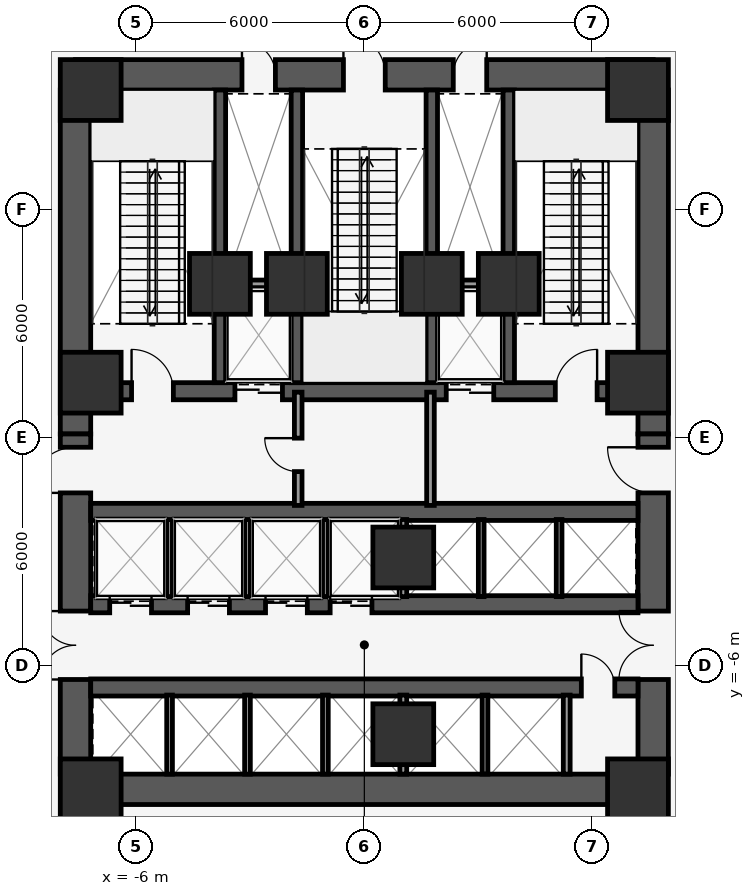
"""IFC4 building model, lengths in metres.
Left out: names, types, materials, properties, quantities, classifications, styles, units other than length and angle.
Written with IfcOpenShell. Run it as: python <this file> out.ifc"""

import sys

from ifc_helpers import new_model, si_unit, direction, frame, frame_2d, origin, origin_2d, place, context, subcontext, project, spatial, rectangle, extrude, element, fill, save


model = new_model("IFC4")
c1 = context("Model", 3, precision=1e-05, world=origin(), true_north=direction((0.0, 1.0)))
c2 = subcontext(c1, "Body", "Model", "MODEL_VIEW")
j1 = project(units=[si_unit("LENGTHUNIT", "METRE"), si_unit("PLANEANGLEUNIT", "RADIAN")], contexts=[c1])
p1 = place(None, origin())
s1 = spatial("IfcSite", under=j1, at=p1, CompositionType="ELEMENT")
p2 = place(p1, origin())
s2 = spatial("IfcBuilding", under=s1, at=p2, CompositionType="ELEMENT")
p3 = place(p2, frame((0.0, 0.0, 6.0)))
s3 = spatial("IfcBuildingStorey", under=s2, at=p3, CompositionType="ELEMENT", Elevation=6.0)
p4 = place(p3, frame((-7.6, 9.55, 0.0), z_axis=(0.0, 0.0, 1.0), x_axis=(1.0, 0.0, 0.0)))
e1 = element("IfcWall", 1, at=p4, inside=s3, PredefinedType="SHEAR", context=c2, shape_type="SweptSolid", body=[
    extrude(rectangle(XDim=15.2, YDim=0.8, at=frame_2d((7.6, 0.0))), origin(), (0.0, 0.0, 1.0), 5.2),
])
p5 = place(p4, frame((7.05, 0.0, 0.0)))
e2 = element("IfcOpeningElement", 2, at=p5, cuts=e1, PredefinedType="OPENING", context=c2, shape_type="SweptSolid", body=[
    extrude(rectangle(XDim=1.1, YDim=2.15, at=frame_2d((0.55, 1.075))), frame((0.0, 0.41, 0.0), z_axis=(0.0, -1.0, 0.0), x_axis=(1.0, 0.0, 0.0)), (0.0, 0.0, 1.0), 0.82),
])
p6 = place(p4, frame((4.38, 0.0, 0.0)))
e3 = element("IfcOpeningElement", 3, at=p6, cuts=e1, PredefinedType="OPENING", context=c2, shape_type="SweptSolid", body=[
    extrude(rectangle(XDim=0.88, YDim=2.15, at=frame_2d((0.44, 1.075))), frame((0.0, 0.41, 0.0), z_axis=(0.0, -1.0, 0.0), x_axis=(1.0, 0.0, 0.0)), (0.0, 0.0, 1.0), 0.82),
])
p7 = place(p4, frame((9.94, 0.0, 0.0)))
e4 = element("IfcOpeningElement", 4, at=p7, cuts=e1, PredefinedType="OPENING", context=c2, shape_type="SweptSolid", body=[
    extrude(rectangle(XDim=0.88, YDim=2.15, at=frame_2d((0.44, 1.075))), frame((0.0, 0.41, 0.0), z_axis=(0.0, -1.0, 0.0), x_axis=(1.0, 0.0, 0.0)), (0.0, 0.0, 1.0), 0.82),
])
p8 = place(p3, frame((-7.2, 1.225, 0.0), z_axis=(0.0, 0.0, 1.0), x_axis=(1.0, 0.0, 0.0)))
e5 = element("IfcWall", 5, at=p8, inside=s3, PredefinedType="SHEAR", context=c2, shape_type="SweptSolid", body=[
    extrude(rectangle(XDim=14.4, YDim=0.45, at=frame_2d((7.2, 0.0))), origin(), (0.0, 0.0, 1.0), 5.2),
])
p9 = place(p8, frame((3.795, 0.0, 0.0)))
e6 = element("IfcOpeningElement", 6, at=p9, cuts=e5, PredefinedType="OPENING", context=c2, shape_type="SweptSolid", body=[
    extrude(rectangle(XDim=1.25, YDim=2.25, at=frame_2d((0.625, 1.125))), frame((0.0, 0.235, 0.0), z_axis=(0.0, -1.0, 0.0), x_axis=(1.0, 0.0, 0.0)), (0.0, 0.0, 1.0), 0.47),
])
p10 = place(p8, frame((9.355, 0.0, 0.0)))
e7 = element("IfcOpeningElement", 7, at=p10, cuts=e5, PredefinedType="OPENING", context=c2, shape_type="SweptSolid", body=[
    extrude(rectangle(XDim=1.25, YDim=2.25, at=frame_2d((0.625, 1.125))), frame((0.0, 0.235, 0.0), z_axis=(0.0, -1.0, 0.0), x_axis=(1.0, 0.0, 0.0)), (0.0, 0.0, 1.0), 0.47),
])
p11 = place(p8, frame((1.075, 0.0, 0.0)))
e8 = element("IfcOpeningElement", 8, at=p11, cuts=e5, PredefinedType="OPENING", context=c2, shape_type="SweptSolid", body=[
    extrude(rectangle(XDim=1.1, YDim=2.15, at=frame_2d((0.55, 1.075))), frame((0.0, 0.235, 0.0), z_axis=(0.0, -1.0, 0.0), x_axis=(1.0, 0.0, 0.0)), (0.0, 0.0, 1.0), 0.47),
])
p12 = place(p8, frame((12.225, 0.0, 0.0)))
e9 = element("IfcOpeningElement", 9, at=p12, cuts=e5, PredefinedType="OPENING", context=c2, shape_type="SweptSolid", body=[
    extrude(rectangle(XDim=1.1, YDim=2.15, at=frame_2d((0.55, 1.075))), frame((0.0, 0.235, 0.0), z_axis=(0.0, -1.0, 0.0), x_axis=(1.0, 0.0, 0.0)), (0.0, 0.0, 1.0), 0.47),
])
for number, where, z_axis, x_axis in (
    (10, (-3.8, 1.45, 0.0), (0.0, 0.0, 1.0), (0.0, 1.0, 0.0)),
    (11, (-1.775, 1.45, 0.0), (0.0, 0.0, 1.0), (0.0, 1.0, 0.0)),
    (12, (1.775, 1.45, 0.0), (0.0, 0.0, 1.0), (0.0, 1.0, 0.0)),
    (13, (3.8, 1.45, 0.0), (0.0, 0.0, 1.0), (0.0, 1.0, 0.0)),
):
    element("IfcWall", number, at=place(p3, frame(where, z_axis=z_axis, x_axis=x_axis)), inside=s3, PredefinedType="SHEAR", context=c2, shape_type="SweptSolid", body=[
        extrude(rectangle(XDim=7.7, YDim=0.3, at=frame_2d((3.85, 0.0))), origin(), (0.0, 0.0, 1.0), 5.2),
    ])
for number, where, z_axis, x_axis in (
    (14, (-7.6, 0.1, 0.0), (0.0, 0.0, 1.0), (0.0, 1.0, 0.0)),
    (15, (7.6, 0.1, 0.0), (0.0, 0.0, 1.0), (0.0, 1.0, 0.0)),
):
    element("IfcWall", number, at=place(p3, frame(where, z_axis=z_axis, x_axis=x_axis)), inside=s3, PredefinedType="SHEAR", context=c2, shape_type="SweptSolid", body=[
        extrude(rectangle(XDim=9.05, YDim=0.8, at=frame_2d((4.525, 0.0))), origin(), (0.0, 0.0, 1.0), 5.2),
    ])
p13 = place(p3, frame((-7.6, -8.85, 0.0), z_axis=(0.0, 0.0, 1.0), x_axis=(0.0, 1.0, 0.0)))
e16 = element("IfcWall", 16, at=p13, inside=s3, PredefinedType="SHEAR", context=c2, shape_type="SweptSolid", body=[
    extrude(rectangle(XDim=8.95, YDim=0.8, at=frame_2d((4.475, 0.0))), origin(), (0.0, 0.0, 1.0), 5.2),
])
p14 = place(p13, frame((2.49, 0.0, 0.0)))
e17 = element("IfcOpeningElement", 17, at=p14, cuts=e16, PredefinedType="OPENING", context=c2, shape_type="SweptSolid", body=[
    extrude(rectangle(XDim=1.8, YDim=2.2, at=frame_2d((0.9, 1.1))), frame((0.0, 0.41, 0.0), z_axis=(0.0, -1.0, 0.0), x_axis=(1.0, 0.0, 0.0)), (0.0, 0.0, 1.0), 0.82),
])
p15 = place(p13, frame((7.4, 0.0, 0.0)))
e18 = element("IfcOpeningElement", 18, at=p15, cuts=e16, PredefinedType="OPENING", context=c2, shape_type="SweptSolid", body=[
    extrude(rectangle(XDim=1.2, YDim=2.15, at=frame_2d((0.6, 1.075))), frame((0.0, 0.41, 0.0), z_axis=(0.0, -1.0, 0.0), x_axis=(1.0, 0.0, 0.0)), (0.0, 0.0, 1.0), 0.82),
])
p16 = place(p3, frame((7.6, -8.85, 0.0), z_axis=(0.0, 0.0, 1.0), x_axis=(0.0, 1.0, 0.0)))
e19 = element("IfcWall", 19, at=p16, inside=s3, PredefinedType="SHEAR", context=c2, shape_type="SweptSolid", body=[
    extrude(rectangle(XDim=8.95, YDim=0.8, at=frame_2d((4.475, 0.0))), origin(), (0.0, 0.0, 1.0), 5.2),
])
p17 = place(p16, frame((2.49, 0.0, 0.0)))
e20 = element("IfcOpeningElement", 20, at=p17, cuts=e19, PredefinedType="OPENING", context=c2, shape_type="SweptSolid", body=[
    extrude(rectangle(XDim=1.8, YDim=2.2, at=frame_2d((0.9, 1.1))), frame((0.0, 0.41, 0.0), z_axis=(0.0, -1.0, 0.0), x_axis=(1.0, 0.0, 0.0)), (0.0, 0.0, 1.0), 0.82),
])
p18 = place(p16, frame((7.4, 0.0, 0.0)))
e21 = element("IfcOpeningElement", 21, at=p18, cuts=e19, PredefinedType="OPENING", context=c2, shape_type="SweptSolid", body=[
    extrude(rectangle(XDim=1.2, YDim=2.15, at=frame_2d((0.6, 1.075))), frame((0.0, 0.41, 0.0), z_axis=(0.0, -1.0, 0.0), x_axis=(1.0, 0.0, 0.0)), (0.0, 0.0, 1.0), 0.82),
])
p19 = place(p3, frame((-7.6, -9.25, 0.0), z_axis=(0.0, 0.0, 1.0), x_axis=(1.0, 0.0, 0.0)))
e22 = element("IfcWall", 22, at=p19, inside=s3, PredefinedType="SHEAR", context=c2, shape_type="SweptSolid", body=[
    extrude(rectangle(XDim=15.2, YDim=0.8, at=frame_2d((7.6, 0.0))), origin(), (0.0, 0.0, 1.0), 5.2),
])
p20 = place(p3, frame((-7.2, -1.95, 0.0), z_axis=(0.0, 0.0, 1.0), x_axis=(1.0, 0.0, 0.0)))
e23 = element("IfcWall", 23, at=p20, inside=s3, PredefinedType="SHEAR", context=c2, shape_type="SweptSolid", body=[
    extrude(rectangle(XDim=14.4, YDim=0.45, at=frame_2d((7.2, 0.0))), origin(), (0.0, 0.0, 1.0), 5.2),
])
p21 = place(p3, frame((-7.2, -4.38, 0.0), z_axis=(0.0, 0.0, 1.0), x_axis=(1.0, 0.0, 0.0)))
e24 = element("IfcWall", 24, at=p21, inside=s3, PredefinedType="SHEAR", context=c2, shape_type="SweptSolid", body=[
    extrude(rectangle(XDim=14.4, YDim=0.45, at=frame_2d((7.2, 0.0))), origin(), (0.0, 0.0, 1.0), 5.2),
])
p22 = place(p21, frame((0.5, 0.0, 0.0)))
e25 = element("IfcOpeningElement", 25, at=p22, cuts=e24, PredefinedType="OPENING", context=c2, shape_type="SweptSolid", body=[
    extrude(rectangle(XDim=1.1, YDim=2.2, at=frame_2d((0.55, 1.1))), frame((0.0, 0.235, 0.0), z_axis=(0.0, -1.0, 0.0), x_axis=(1.0, 0.0, 0.0)), (0.0, 0.0, 1.0), 0.47),
])
p23 = place(p21, frame((2.55, 0.0, 0.0)))
e26 = element("IfcOpeningElement", 26, at=p23, cuts=e24, PredefinedType="OPENING", context=c2, shape_type="SweptSolid", body=[
    extrude(rectangle(XDim=1.1, YDim=2.2, at=frame_2d((0.55, 1.1))), frame((0.0, 0.235, 0.0), z_axis=(0.0, -1.0, 0.0), x_axis=(1.0, 0.0, 0.0)), (0.0, 0.0, 1.0), 0.47),
])
p24 = place(p21, frame((4.6, 0.0, 0.0)))
e27 = element("IfcOpeningElement", 27, at=p24, cuts=e24, PredefinedType="OPENING", context=c2, shape_type="SweptSolid", body=[
    extrude(rectangle(XDim=1.1, YDim=2.2, at=frame_2d((0.55, 1.1))), frame((0.0, 0.235, 0.0), z_axis=(0.0, -1.0, 0.0), x_axis=(1.0, 0.0, 0.0)), (0.0, 0.0, 1.0), 0.47),
])
p25 = place(p21, frame((6.3, 0.0, 0.0)))
e28 = element("IfcOpeningElement", 28, at=p25, cuts=e24, PredefinedType="OPENING", context=c2, shape_type="SweptSolid", body=[
    extrude(rectangle(XDim=1.1, YDim=2.2, at=frame_2d((0.55, 1.1))), frame((0.0, 0.235, 0.0), z_axis=(0.0, -1.0, 0.0), x_axis=(1.0, 0.0, 0.0)), (0.0, 0.0, 1.0), 0.47),
])
p26 = place(p3, frame((-7.2, -6.57, 0.0), z_axis=(0.0, 0.0, 1.0), x_axis=(1.0, 0.0, 0.0)))
e29 = element("IfcWall", 29, at=p26, inside=s3, PredefinedType="SHEAR", context=c2, shape_type="SweptSolid", body=[
    extrude(rectangle(XDim=14.4, YDim=0.45, at=frame_2d((7.2, 0.0))), origin(), (0.0, 0.0, 1.0), 5.2),
])
p27 = place(p26, frame((12.91, 0.0, 0.0)))
e30 = element("IfcOpeningElement", 30, at=p27, cuts=e29, PredefinedType="OPENING", context=c2, shape_type="SweptSolid", body=[
    extrude(rectangle(XDim=0.88, YDim=2.15, at=frame_2d((0.44, 1.075))), frame((0.0, 0.235, 0.0), z_axis=(0.0, -1.0, 0.0), x_axis=(1.0, 0.0, 0.0)), (0.0, 0.0, 1.0), 0.47),
])
for number, where, z_axis, x_axis in (
    (31, (-7.2, -9.25, 0.0), (0.0, 0.0, 1.0), (1.0, 0.0, 0.0)),
    (32, (7.2, -9.25, 0.0), (0.0, 0.0, 1.0), (1.0, 0.0, 0.0)),
    (33, (7.2, 1.45, 0.0), (0.0, 0.0, 1.0), (1.0, 0.0, 0.0)),
    (34, (7.2, 9.15, 0.0), (0.0, 0.0, 1.0), (1.0, 0.0, 0.0)),
    (35, (-7.2, 9.15, 0.0), (0.0, 0.0, 1.0), (1.0, 0.0, 0.0)),
    (36, (-7.2, 1.45, 0.0), (0.0, 0.0, 1.0), (1.0, 0.0, 0.0)),
    (37, (-3.8, 4.05, 0.0), (0.0, 0.0, 1.0), (1.0, 0.0, 0.0)),
    (38, (3.8, 4.05, 0.0), (0.0, 0.0, 1.0), (1.0, 0.0, 0.0)),
    (39, (-1.775, 4.05, 0.0), (0.0, 0.0, 1.0), (1.0, 0.0, 0.0)),
    (40, (1.775, 4.05, 0.0), (0.0, 0.0, 1.0), (1.0, 0.0, 0.0)),
    (41, (1.025, -3.15, 0.0), (0.0, 0.0, 1.0), (1.0, 0.0, 0.0)),
    (42, (1.025, -7.8, 0.0), (0.0, 0.0, 1.0), (1.0, 0.0, 0.0)),
):
    element("IfcColumn", number, at=place(p3, frame(where, z_axis=z_axis, x_axis=x_axis)), inside=s3, PredefinedType="COLUMN", context=c2, shape_type="SweptSolid", body=[
        extrude(rectangle(XDim=1.6, YDim=1.6, at=origin_2d()), origin(), (0.0, 0.0, 1.0), 5.5),
    ])
for number, where, z_axis, x_axis in (
    (43, (-3.65, 4.05, 0.0), (0.0, 0.0, 1.0), (1.0, 0.0, 0.0)),
    (44, (1.92, 4.05, 0.0), (0.0, 0.0, 1.0), (1.0, 0.0, 0.0)),
):
    element("IfcWall", number, at=place(p3, frame(where, z_axis=z_axis, x_axis=x_axis)), inside=s3, PredefinedType="PARTITIONING", context=c2, shape_type="SweptSolid", body=[
        extrude(rectangle(XDim=1.73, YDim=0.2, at=frame_2d((0.865, 0.0))), origin(), (0.0, 0.0, 1.0), 5.2),
    ])
for number, where, z_axis, x_axis in (
    (45, (-5.125, -4.18, 0.0), (0.0, 0.0, 1.0), (0.0, 1.0, 0.0)),
    (46, (-3.075, -4.18, 0.0), (0.0, 0.0, 1.0), (0.0, 1.0, 0.0)),
    (47, (-1.025, -4.18, 0.0), (0.0, 0.0, 1.0), (0.0, 1.0, 0.0)),
):
    element("IfcWall", number, at=place(p3, frame(where, z_axis=z_axis, x_axis=x_axis)), inside=s3, PredefinedType="PARTITIONING", context=c2, shape_type="SweptSolid", body=[
        extrude(rectangle(XDim=2.03, YDim=0.15, at=frame_2d((1.015, 0.0))), origin(), (0.0, 0.0, 1.0), 5.2),
    ])
p28 = place(p3, frame((1.025, -4.18, 0.0), z_axis=(0.0, 0.0, 1.0), x_axis=(0.0, 1.0, 0.0)))
e48 = element("IfcWall", 48, at=p28, inside=s3, PredefinedType="PARTITIONING", context=c2, shape_type="SweptSolid", body=[
    extrude(rectangle(XDim=2.03, YDim=0.18, at=frame_2d((1.015, 0.0))), origin(), (0.0, 0.0, 1.0), 4.248),
])
for number, where, z_axis, x_axis in (
    (49, (3.075, -4.18, 0.0), (0.0, 0.0, 1.0), (0.0, 1.0, 0.0)),
    (50, (5.125, -4.18, 0.0), (0.0, 0.0, 1.0), (0.0, 1.0, 0.0)),
):
    element("IfcWall", number, at=place(p3, frame(where, z_axis=z_axis, x_axis=x_axis)), inside=s3, PredefinedType="PARTITIONING", context=c2, shape_type="SweptSolid", body=[
        extrude(rectangle(XDim=2.03, YDim=0.15, at=frame_2d((1.015, 0.0))), origin(), (0.0, 0.0, 1.0), 5.2),
    ])
for number, where, z_axis, x_axis in (
    (51, (-5.125, -8.85, 0.0), (0.0, 0.0, 1.0), (0.0, 1.0, 0.0)),
    (52, (-3.075, -8.85, 0.0), (0.0, 0.0, 1.0), (0.0, 1.0, 0.0)),
    (53, (-1.025, -8.85, 0.0), (0.0, 0.0, 1.0), (0.0, 1.0, 0.0)),
):
    element("IfcWall", number, at=place(p3, frame(where, z_axis=z_axis, x_axis=x_axis)), inside=s3, PredefinedType="PARTITIONING", context=c2, shape_type="SweptSolid", body=[
        extrude(rectangle(XDim=2.08, YDim=0.15, at=frame_2d((1.04, 0.0))), origin(), (0.0, 0.0, 1.0), 5.2),
    ])
p29 = place(p3, frame((1.025, -8.85, 0.0), z_axis=(0.0, 0.0, 1.0), x_axis=(0.0, 1.0, 0.0)))
e54 = element("IfcWall", 54, at=p29, inside=s3, PredefinedType="PARTITIONING", context=c2, shape_type="SweptSolid", body=[
    extrude(rectangle(XDim=2.08, YDim=0.18, at=frame_2d((1.04, 0.0))), origin(), (0.0, 0.0, 1.0), 4.248),
])
p30 = place(p3, frame((3.175, -8.85, 0.0), z_axis=(0.0, 0.0, 1.0), x_axis=(0.0, 1.0, 0.0)))
e55 = element("IfcWall", 55, at=p30, inside=s3, PredefinedType="PARTITIONING", context=c2, shape_type="SweptSolid", body=[
    extrude(rectangle(XDim=2.08, YDim=0.15, at=frame_2d((1.04, 0.0))), origin(), (0.0, 0.0, 1.0), 5.2),
])
p31 = place(p3, frame((5.325, -8.85, 0.0), z_axis=(0.0, 0.0, 1.0), x_axis=(0.0, 1.0, 0.0)))
e56 = element("IfcWall", 56, at=p31, inside=s3, PredefinedType="PARTITIONING", context=c2, shape_type="SweptSolid", body=[
    extrude(rectangle(XDim=2.08, YDim=0.18, at=frame_2d((1.04, 0.0))), origin(), (0.0, 0.0, 1.0), 5.2),
])
p32 = place(p3, frame((-1.74, -1.78, 0.0), z_axis=(0.0, 0.0, 1.0), x_axis=(0.0, 1.0, 0.0)))
e57 = element("IfcWall", 57, at=p32, inside=s3, PredefinedType="PARTITIONING", context=c2, shape_type="SweptSolid", body=[
    extrude(rectangle(XDim=2.98, YDim=0.2, at=frame_2d((1.49, 0.0))), origin(), (0.0, 0.0, 1.0), 5.2),
])
p33 = place(p32, frame((0.89, 0.0, 0.0)))
e58 = element("IfcOpeningElement", 58, at=p33, cuts=e57, PredefinedType="OPENING", context=c2, shape_type="SweptSolid", body=[
    extrude(rectangle(XDim=0.88, YDim=2.15, at=frame_2d((0.44, 1.075))), frame((0.0, 0.11, 0.0), z_axis=(0.0, -1.0, 0.0), x_axis=(1.0, 0.0, 0.0)), (0.0, 0.0, 1.0), 0.22),
])
p34 = place(p3, frame((1.74, -1.78, 0.0), z_axis=(0.0, 0.0, 1.0), x_axis=(0.0, 1.0, 0.0)))
e59 = element("IfcWall", 59, at=p34, inside=s3, PredefinedType="PARTITIONING", context=c2, shape_type="SweptSolid", body=[
    extrude(rectangle(XDim=2.98, YDim=0.2, at=frame_2d((1.49, 0.0))), origin(), (0.0, 0.0, 1.0), 5.2),
])
p35 = place(p22, origin())
e60 = element("IfcDoor", 60, at=p35, inside=s3, OperationType="DOUBLE_DOOR_SLIDING", PredefinedType="DOOR", context=c2, shape_type="SweptSolid", body=[
    extrude(rectangle(XDim=1.1, YDim=2.2, at=frame_2d((0.55, 1.1))), frame((0.0, 0.025, 0.0), z_axis=(0.0, -1.0, 0.0), x_axis=(1.0, 0.0, 0.0)), (0.0, 0.0, 1.0), 0.05),
])
fill(e25, e60)
p36 = place(p23, origin())
e61 = element("IfcDoor", 61, at=p36, inside=s3, OperationType="DOUBLE_DOOR_SLIDING", PredefinedType="DOOR", context=c2, shape_type="SweptSolid", body=[
    extrude(rectangle(XDim=1.1, YDim=2.2, at=frame_2d((0.55, 1.1))), frame((0.0, 0.025, 0.0), z_axis=(0.0, -1.0, 0.0), x_axis=(1.0, 0.0, 0.0)), (0.0, 0.0, 1.0), 0.05),
])
fill(e26, e61)
p37 = place(p24, origin())
e62 = element("IfcDoor", 62, at=p37, inside=s3, OperationType="DOUBLE_DOOR_SLIDING", PredefinedType="DOOR", context=c2, shape_type="SweptSolid", body=[
    extrude(rectangle(XDim=1.1, YDim=2.2, at=frame_2d((0.55, 1.1))), frame((0.0, 0.025, 0.0), z_axis=(0.0, -1.0, 0.0), x_axis=(1.0, 0.0, 0.0)), (0.0, 0.0, 1.0), 0.05),
])
fill(e27, e62)
p38 = place(p25, origin())
e63 = element("IfcDoor", 63, at=p38, inside=s3, OperationType="DOUBLE_DOOR_SLIDING", PredefinedType="DOOR", context=c2, shape_type="SweptSolid", body=[
    extrude(rectangle(XDim=1.1, YDim=2.2, at=frame_2d((0.55, 1.1))), frame((0.0, 0.025, 0.0), z_axis=(0.0, -1.0, 0.0), x_axis=(1.0, 0.0, 0.0)), (0.0, 0.0, 1.0), 0.05),
])
fill(e28, e63)
p39 = place(p9, origin())
e64 = element("IfcDoor", 64, at=p39, inside=s3, OperationType="DOUBLE_DOOR_SLIDING", PredefinedType="DOOR", context=c2, shape_type="SweptSolid", body=[
    extrude(rectangle(XDim=1.25, YDim=2.25, at=frame_2d((0.625, 1.125))), frame((0.0, 0.025, 0.0), z_axis=(0.0, -1.0, 0.0), x_axis=(1.0, 0.0, 0.0)), (0.0, 0.0, 1.0), 0.05),
])
fill(e6, e64)
p40 = place(p10, origin())
e65 = element("IfcDoor", 65, at=p40, inside=s3, OperationType="DOUBLE_DOOR_SLIDING", PredefinedType="DOOR", context=c2, shape_type="SweptSolid", body=[
    extrude(rectangle(XDim=1.25, YDim=2.25, at=frame_2d((0.625, 1.125))), frame((0.0, 0.025, 0.0), z_axis=(0.0, -1.0, 0.0), x_axis=(1.0, 0.0, 0.0)), (0.0, 0.0, 1.0), 0.05),
])
fill(e7, e65)
p41 = place(p11, origin())
e66 = element("IfcDoor", 66, at=p41, inside=s3, OperationType="SINGLE_SWING_LEFT", PredefinedType="DOOR", context=c2, shape_type="SweptSolid", body=[
    extrude(rectangle(XDim=1.1, YDim=2.15, at=frame_2d((0.55, 1.075))), frame((0.0, 0.025, 0.0), z_axis=(0.0, -1.0, 0.0), x_axis=(1.0, 0.0, 0.0)), (0.0, 0.0, 1.0), 0.05),
])
fill(e8, e66)
p42 = place(p12, origin())
e67 = element("IfcDoor", 67, at=p42, inside=s3, OperationType="SINGLE_SWING_RIGHT", PredefinedType="DOOR", context=c2, shape_type="SweptSolid", body=[
    extrude(rectangle(XDim=1.1, YDim=2.15, at=frame_2d((0.55, 1.075))), frame((0.0, 0.025, 0.0), z_axis=(0.0, -1.0, 0.0), x_axis=(1.0, 0.0, 0.0)), (0.0, 0.0, 1.0), 0.05),
])
fill(e9, e67)
p43 = place(p5, origin())
e68 = element("IfcDoor", 68, at=p43, inside=s3, OperationType="SINGLE_SWING_LEFT", PredefinedType="DOOR", context=c2, shape_type="SweptSolid", body=[
    extrude(rectangle(XDim=1.1, YDim=2.15, at=frame_2d((0.55, 1.075))), frame((0.0, 0.025, 0.0), z_axis=(0.0, -1.0, 0.0), x_axis=(1.0, 0.0, 0.0)), (0.0, 0.0, 1.0), 0.05),
])
fill(e2, e68)
p44 = place(p6, origin())
e69 = element("IfcDoor", 69, at=p44, inside=s3, OperationType="SINGLE_SWING_LEFT", PredefinedType="DOOR", context=c2, shape_type="SweptSolid", body=[
    extrude(rectangle(XDim=0.88, YDim=2.15, at=frame_2d((0.44, 1.075))), frame((0.0, 0.025, 0.0), z_axis=(0.0, -1.0, 0.0), x_axis=(1.0, 0.0, 0.0)), (0.0, 0.0, 1.0), 0.05),
])
fill(e3, e69)
p45 = place(p7, origin())
e70 = element("IfcDoor", 70, at=p45, inside=s3, OperationType="SINGLE_SWING_RIGHT", PredefinedType="DOOR", context=c2, shape_type="SweptSolid", body=[
    extrude(rectangle(XDim=0.88, YDim=2.15, at=frame_2d((0.44, 1.075))), frame((0.0, 0.025, 0.0), z_axis=(0.0, -1.0, 0.0), x_axis=(1.0, 0.0, 0.0)), (0.0, 0.0, 1.0), 0.05),
])
fill(e4, e70)
p46 = place(p14, origin())
e71 = element("IfcDoor", 71, at=p46, inside=s3, OperationType="DOUBLE_DOOR_SINGLE_SWING", PredefinedType="DOOR", context=c2, shape_type="SweptSolid", body=[
    extrude(rectangle(XDim=1.8, YDim=2.2, at=frame_2d((0.9, 1.1))), frame((0.0, 0.025, 0.0), z_axis=(0.0, -1.0, 0.0), x_axis=(1.0, 0.0, 0.0)), (0.0, 0.0, 1.0), 0.05),
])
fill(e17, e71)
p47 = place(p15, origin())
e72 = element("IfcDoor", 72, at=p47, inside=s3, OperationType="SINGLE_SWING_LEFT", PredefinedType="DOOR", context=c2, shape_type="SweptSolid", body=[
    extrude(rectangle(XDim=1.2, YDim=2.15, at=frame_2d((0.6, 1.075))), frame((0.0, 0.025, 0.0), z_axis=(0.0, -1.0, 0.0), x_axis=(1.0, 0.0, 0.0)), (0.0, 0.0, 1.0), 0.05),
])
fill(e18, e72)
p48 = place(p17, origin())
e73 = element("IfcDoor", 73, at=p48, inside=s3, OperationType="DOUBLE_DOOR_SINGLE_SWING", PredefinedType="DOOR", context=c2, shape_type="SweptSolid", body=[
    extrude(rectangle(XDim=1.8, YDim=2.2, at=frame_2d((0.9, 1.1))), frame((0.0, 0.025, 0.0), z_axis=(0.0, -1.0, 0.0), x_axis=(1.0, 0.0, 0.0)), (0.0, 0.0, 1.0), 0.05),
])
fill(e20, e73)
p49 = place(p18, origin())
e74 = element("IfcDoor", 74, at=p49, inside=s3, OperationType="SINGLE_SWING_RIGHT", PredefinedType="DOOR", context=c2, shape_type="SweptSolid", body=[
    extrude(rectangle(XDim=1.2, YDim=2.15, at=frame_2d((0.6, 1.075))), frame((0.0, 0.025, 0.0), z_axis=(0.0, -1.0, 0.0), x_axis=(1.0, 0.0, 0.0)), (0.0, 0.0, 1.0), 0.05),
])
fill(e21, e74)
p50 = place(p27, origin())
e75 = element("IfcDoor", 75, at=p50, inside=s3, OperationType="SINGLE_SWING_LEFT", PredefinedType="DOOR", context=c2, shape_type="SweptSolid", body=[
    extrude(rectangle(XDim=0.88, YDim=2.15, at=frame_2d((0.44, 1.075))), frame((0.0, 0.025, 0.0), z_axis=(0.0, -1.0, 0.0), x_axis=(1.0, 0.0, 0.0)), (0.0, 0.0, 1.0), 0.05),
])
fill(e30, e75)
p51 = place(p33, origin())
e76 = element("IfcDoor", 76, at=p51, inside=s3, OperationType="SINGLE_SWING_RIGHT", PredefinedType="DOOR", context=c2, shape_type="SweptSolid", body=[
    extrude(rectangle(XDim=0.88, YDim=2.15, at=frame_2d((0.44, 1.075))), frame((0.0, 0.025, 0.0), z_axis=(0.0, -1.0, 0.0), x_axis=(1.0, 0.0, 0.0)), (0.0, 0.0, 1.0), 0.05),
])
fill(e58, e76)
save(model, sys.argv[1])
